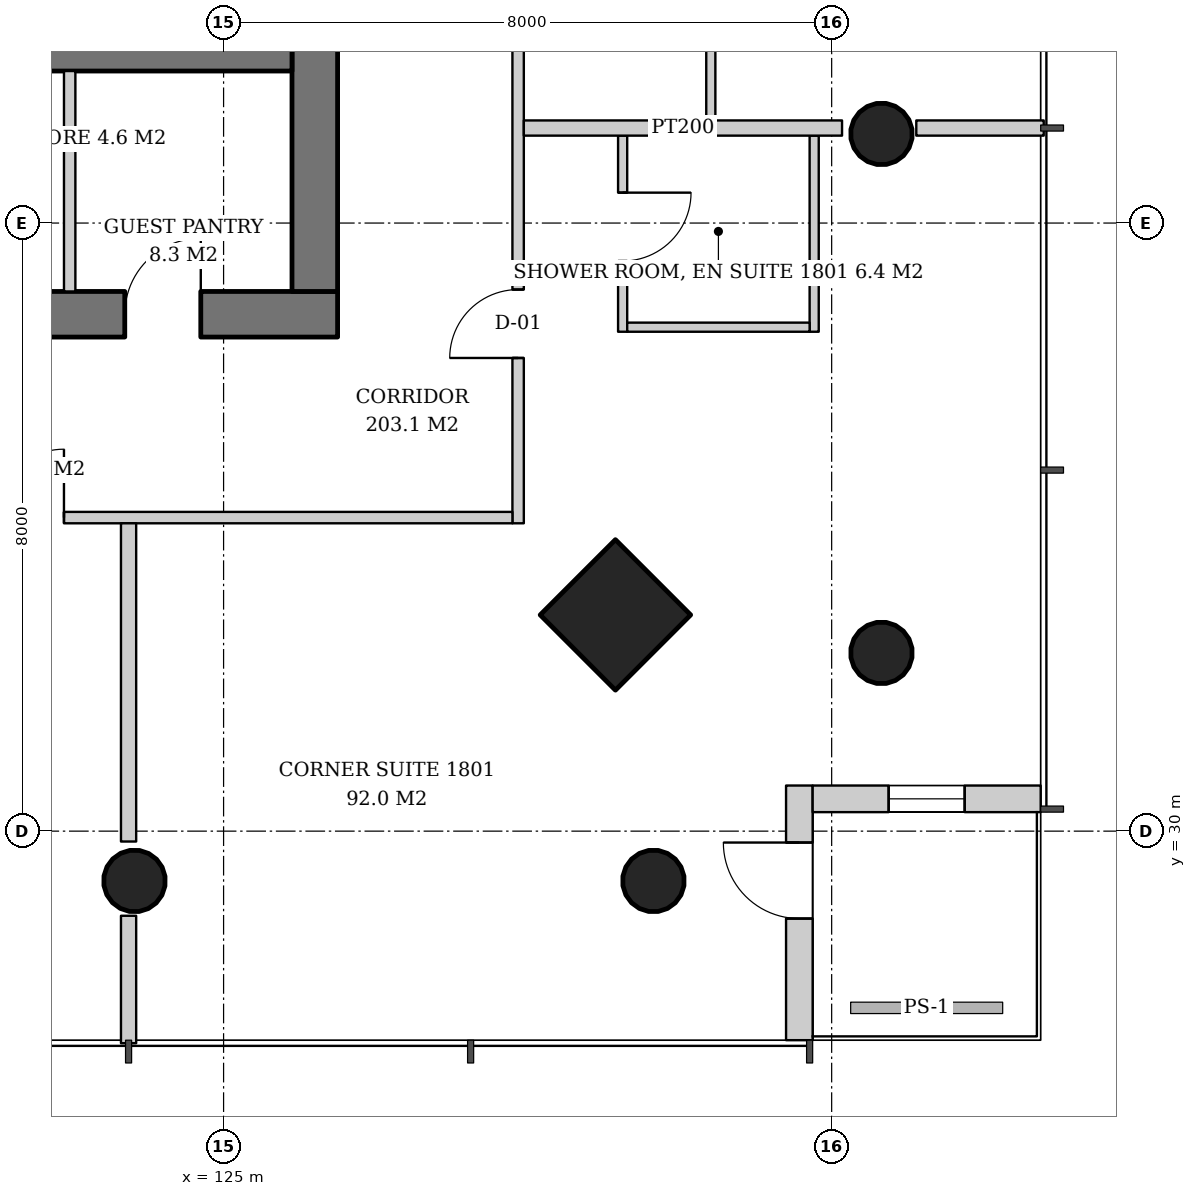
"""IFC4 building model, lengths in metres.
Left out: names, types, materials, properties, quantities, classifications, styles, units other than length and angle.
Written with IfcOpenShell. Run it as: python <this file> out.ifc"""

import sys

from ifc_helpers import new_model, si_unit, direction, frame, frame_2d, origin, origin_2d, place, context, subcontext, project, spatial, rectangle, hollow_circle, extrude, element, fill, save


model = new_model("IFC4")
c1 = context("Model", 3, precision=1e-05, world=origin(), true_north=direction((0.0, 1.0)))
c2 = subcontext(c1, "Body", "Model", "MODEL_VIEW")
j1 = project(units=[si_unit("LENGTHUNIT", "METRE"), si_unit("PLANEANGLEUNIT", "RADIAN")], contexts=[c1])
p1 = place(None, origin())
s1 = spatial("IfcSite", under=j1, at=p1, CompositionType="ELEMENT")
p2 = place(p1, origin())
s2 = spatial("IfcBuilding", under=s1, at=p2, CompositionType="ELEMENT")
p3 = place(p2, frame((0.0, 0.0, 74.2)))
s3 = spatial("IfcBuildingStorey", under=s2, at=p3, CompositionType="ELEMENT", Elevation=74.2)
p4 = place(p3, frame((133.707, 32.293, 0.0), z_axis=(-0.042965756413, 0.042965756413, 0.998152236661), x_axis=(-0.707106781187, -0.707106781187, 0.0)))
e1 = element("IfcColumn", 1, at=p4, inside=s3, PredefinedType="COLUMN", context=c2, shape_type="SweptSolid", body=[
    extrude(hollow_circle(Radius=0.406, WallThickness=0.03, at=origin_2d()), origin(), (0.0, 0.0, 1.0), 3.807),
])
p5 = place(p3, frame((133.707, 39.146, 0.0), z_axis=(-0.042995471882, 0.021561908287, 0.998842566929), x_axis=(-0.448280611873, -0.89389288677, 0.0)))
e2 = element("IfcColumn", 2, at=p5, inside=s3, PredefinedType="COLUMN", context=c2, shape_type="SweptSolid", body=[
    extrude(hollow_circle(Radius=0.406, WallThickness=0.03, at=origin_2d()), origin(), (0.0, 0.0, 1.0), 3.804),
])
p6 = place(p3, frame((130.207, 32.793, 0.0), z_axis=(-0.042965756413, 0.042965756413, 0.998152236661), x_axis=(-0.707106781187, -0.707106781187, 0.0)))
e3 = element("IfcColumn", 3, at=p6, inside=s3, PredefinedType="COLUMN", context=c2, shape_type="SweptSolid", body=[
    extrude(rectangle(XDim=1.4, YDim=1.4, at=origin_2d()), origin(), (0.0, 0.0, 1.0), 3.807),
])
p7 = place(p3, frame((130.707, 29.293, 0.0), z_axis=(-0.042965756413, 0.042965756413, 0.998152236661), x_axis=(-0.707106781187, -0.707106781187, 0.0)))
e4 = element("IfcColumn", 4, at=p7, inside=s3, PredefinedType="COLUMN", context=c2, shape_type="SweptSolid", body=[
    extrude(hollow_circle(Radius=0.406, WallThickness=0.03, at=origin_2d()), origin(), (0.0, 0.0, 1.0), 3.807),
])
p8 = place(p3, frame((123.854, 29.293, 0.0), z_axis=(-0.021561908287, 0.042995471882, 0.998842566929), x_axis=(-0.89389288677, -0.448280611873, 0.0)))
e5 = element("IfcColumn", 5, at=p8, inside=s3, PredefinedType="COLUMN", context=c2, shape_type="SweptSolid", body=[
    extrude(hollow_circle(Radius=0.406, WallThickness=0.03, at=origin_2d()), origin(), (0.0, 0.0, 1.0), 3.804),
])
p9 = place(p3, frame((107.5, 36.8, 0.0), z_axis=(0.0, 0.0, 1.0), x_axis=(1.0, 0.0, 0.0)))
e6 = element("IfcWall", 6, at=p9, inside=s3, PredefinedType="SHEAR", context=c2, shape_type="SweptSolid", body=[
    extrude(rectangle(XDim=19.0, YDim=0.6, at=frame_2d((9.5, 0.0))), origin(), (0.0, 0.0, 1.0), 3.8),
])
p10 = place(p9, frame((3.9, 0.0, 0.0)))
e7 = element("IfcOpeningElement", 7, at=p10, cuts=e6, PredefinedType="OPENING", context=c2, shape_type="SweptSolid", body=[
    extrude(rectangle(XDim=1.0, YDim=2.1, at=frame_2d((0.5, 1.05))), frame((0.0, 0.31, 0.0), z_axis=(0.0, -1.0, 0.0), x_axis=(1.0, 0.0, 0.0)), (0.0, 0.0, 1.0), 0.62),
])
p11 = place(p9, frame((14.153, 0.0, 0.0)))
e8 = element("IfcOpeningElement", 8, at=p11, cuts=e6, PredefinedType="OPENING", context=c2, shape_type="SweptSolid", body=[
    extrude(rectangle(XDim=1.0, YDim=2.1, at=frame_2d((0.5, 1.05))), frame((0.0, 0.31, 0.0), z_axis=(0.0, -1.0, 0.0), x_axis=(1.0, 0.0, 0.0)), (0.0, 0.0, 1.0), 0.62),
])
p12 = place(p9, frame((16.2, 0.0, 0.0)))
e9 = element("IfcOpeningElement", 9, at=p12, cuts=e6, PredefinedType="OPENING", context=c2, shape_type="SweptSolid", body=[
    extrude(rectangle(XDim=1.0, YDim=2.1, at=frame_2d((0.5, 1.05))), frame((0.0, 0.31, 0.0), z_axis=(0.0, -1.0, 0.0), x_axis=(1.0, 0.0, 0.0)), (0.0, 0.0, 1.0), 0.62),
])
p13 = place(p3, frame((126.2, 37.1, 0.0), z_axis=(0.0, 0.0, 1.0), x_axis=(0.0, 1.0, 0.0)))
e10 = element("IfcWall", 10, at=p13, inside=s3, PredefinedType="SHEAR", context=c2, shape_type="SweptSolid", body=[
    extrude(rectangle(XDim=17.8, YDim=0.6, at=frame_2d((8.9, 0.0))), origin(), (0.0, 0.0, 1.0), 3.8),
])
p14 = place(p13, frame((8.0, 0.0, 0.0)))
e11 = element("IfcOpeningElement", 11, at=p14, cuts=e10, PredefinedType="OPENING", context=c2, shape_type="SweptSolid", body=[
    extrude(rectangle(XDim=1.8, YDim=2.4, at=frame_2d((0.9, 1.2))), frame((0.0, 0.31, 0.0), z_axis=(0.0, -1.0, 0.0), x_axis=(1.0, 0.0, 0.0)), (0.0, 0.0, 1.0), 0.62),
])
p15 = place(p3, frame((108.1, 40.2, 0.0), z_axis=(0.0, 0.0, 1.0), x_axis=(1.0, 0.0, 0.0)))
e12 = element("IfcWall", 12, at=p15, inside=s3, PredefinedType="SHEAR", context=c2, shape_type="SweptSolid", body=[
    extrude(rectangle(XDim=17.8, YDim=0.4, at=frame_2d((8.9, 0.0))), origin(), (0.0, 0.0, 1.0), 3.8),
])
p16 = place(p3, frame((132.575, 27.25, 0.0), z_axis=(0.0, 0.0, 1.0), x_axis=(0.0, 1.0, 0.0)))
e13 = element("IfcWall", 13, at=p16, inside=s3, PredefinedType="SOLIDWALL", context=c2, shape_type="SweptSolid", body=[
    extrude(rectangle(XDim=3.35, YDim=0.35, at=frame_2d((1.675, 0.0))), origin(), (0.0, 0.0, 1.0), 3.6),
])
p17 = place(p16, frame((1.6, 0.0, 0.0)))
e14 = element("IfcOpeningElement", 14, at=p17, cuts=e13, PredefinedType="OPENING", context=c2, shape_type="SweptSolid", body=[
    extrude(rectangle(XDim=1.0, YDim=2.4, at=frame_2d((0.5, 1.2))), frame((0.0, 0.185, 0.0), z_axis=(0.0, -1.0, 0.0), x_axis=(1.0, 0.0, 0.0)), (0.0, 0.0, 1.0), 0.37),
])
p18 = place(p3, frame((132.75, 30.425, 0.0), z_axis=(0.0, 0.0, 1.0), x_axis=(1.0, 0.0, 0.0)))
e15 = element("IfcWall", 15, at=p18, inside=s3, PredefinedType="SOLIDWALL", context=c2, shape_type="SweptSolid", body=[
    extrude(rectangle(XDim=3.0, YDim=0.35, at=frame_2d((1.5, 0.0))), origin(), (0.0, 0.0, 1.0), 3.6),
])
p19 = place(p18, frame((1.0, 0.0, 0.9)))
e16 = element("IfcOpeningElement", 16, at=p19, cuts=e15, PredefinedType="OPENING", context=c2, shape_type="SweptSolid", body=[
    extrude(rectangle(XDim=1.0, YDim=2.4, at=frame_2d((0.5, 1.2))), frame((0.0, 0.185, 0.0), z_axis=(0.0, -1.0, 0.0), x_axis=(1.0, 0.0, 0.0)), (0.0, 0.0, 1.0), 0.37),
])
p20 = place(p3, frame((122.975, 37.1, 0.0), z_axis=(0.0, 0.0, 1.0), x_axis=(0.0, 1.0, 0.0)))
e17 = element("IfcWall", 17, at=p20, inside=s3, PredefinedType="SOLIDWALL", context=c2, shape_type="SweptSolid", body=[
    extrude(rectangle(XDim=2.9, YDim=0.15, at=frame_2d((1.45, 0.0))), origin(), (0.0, 0.0, 1.0), 3.6),
])
p21 = place(p3, frame((130.25, 39.15, 0.0), z_axis=(0.0, 0.0, 1.0), x_axis=(0.0, -1.0, 0.0)))
e18 = element("IfcWall", 18, at=p21, inside=s3, PredefinedType="PARTITIONING", context=c2, shape_type="SweptSolid", body=[
    extrude(rectangle(XDim=2.58, YDim=0.12, at=frame_2d((1.29, 0.0))), origin(), (0.0, 0.0, 1.0), 2.8),
])
p22 = place(p21, frame((0.75, 0.0, 0.0)))
e19 = element("IfcOpeningElement", 19, at=p22, cuts=e18, PredefinedType="OPENING", context=c2, shape_type="SweptSolid", body=[
    extrude(rectangle(XDim=0.9, YDim=2.1, at=frame_2d((0.45, 1.05))), frame((0.0, 0.07, 0.0), z_axis=(0.0, -1.0, 0.0), x_axis=(1.0, 0.0, 0.0)), (0.0, 0.0, 1.0), 0.14),
])
p23 = place(p3, frame((132.77, 39.15, 0.0), z_axis=(0.0, 0.0, 1.0), x_axis=(0.0, -1.0, 0.0)))
e20 = element("IfcWall", 20, at=p23, inside=s3, PredefinedType="PARTITIONING", context=c2, shape_type="SweptSolid", body=[
    extrude(rectangle(XDim=2.58, YDim=0.12, at=frame_2d((1.29, 0.0))), origin(), (0.0, 0.0, 1.0), 2.8),
])
p24 = place(p3, frame((130.31, 36.63, 0.0), z_axis=(0.0, 0.0, 1.0), x_axis=(1.0, 0.0, 0.0)))
e21 = element("IfcWall", 21, at=p24, inside=s3, PredefinedType="PARTITIONING", context=c2, shape_type="SweptSolid", body=[
    extrude(rectangle(XDim=2.4, YDim=0.12, at=frame_2d((1.2, 0.0))), origin(), (0.0, 0.0, 1.0), 2.8),
])
p25 = place(p3, frame((131.41, 39.35, 0.0), z_axis=(0.0, 0.0, 1.0), x_axis=(0.0, 1.0, 0.0)))
e22 = element("IfcWall", 22, at=p25, inside=s3, PredefinedType="PARTITIONING", context=c2, shape_type="SweptSolid", body=[
    extrude(rectangle(XDim=2.42, YDim=0.12, at=frame_2d((1.21, 0.0))), origin(), (0.0, 0.0, 1.0), 2.847),
])
p26 = place(p3, frame((128.875, 34.05, 0.0), z_axis=(0.0, 0.0, 1.0), x_axis=(0.0, 1.0, 0.0)))
e23 = element("IfcWall", 23, at=p26, inside=s3, PredefinedType="PARTITIONING", context=c2, shape_type="SweptSolid", body=[
    extrude(rectangle(XDim=23.75, YDim=0.15, at=frame_2d((11.875, 0.0))), origin(), (0.0, 0.0, 1.0), 2.8),
])
p27 = place(p26, frame((2.175, 0.0, 0.0)))
e24 = element("IfcOpeningElement", 24, at=p27, cuts=e23, PredefinedType="OPENING", context=c2, shape_type="SweptSolid", body=[
    extrude(rectangle(XDim=0.9, YDim=2.1, at=frame_2d((0.45, 1.05))), frame((0.0, 0.085, 0.0), z_axis=(0.0, -1.0, 0.0), x_axis=(1.0, 0.0, 0.0)), (0.0, 0.0, 1.0), 0.17),
])
p28 = place(p26, frame((7.95, 0.0, 0.0)))
e25 = element("IfcOpeningElement", 25, at=p28, cuts=e23, PredefinedType="OPENING", context=c2, shape_type="SweptSolid", body=[
    extrude(rectangle(XDim=0.9, YDim=2.1, at=frame_2d((0.45, 1.05))), frame((0.0, 0.085, 0.0), z_axis=(0.0, -1.0, 0.0), x_axis=(1.0, 0.0, 0.0)), (0.0, 0.0, 1.0), 0.17),
])
p29 = place(p26, frame((14.8, 0.0, 0.0)))
e26 = element("IfcOpeningElement", 26, at=p29, cuts=e23, PredefinedType="OPENING", context=c2, shape_type="SweptSolid", body=[
    extrude(rectangle(XDim=0.9, YDim=2.1, at=frame_2d((0.45, 1.05))), frame((0.0, 0.085, 0.0), z_axis=(0.0, -1.0, 0.0), x_axis=(1.0, 0.0, 0.0)), (0.0, 0.0, 1.0), 0.17),
])
p30 = place(p3, frame((128.95, 39.25, 0.0), z_axis=(0.0, 0.0, 1.0), x_axis=(1.0, 0.0, 0.0)))
e27 = element("IfcWall", 27, at=p30, inside=s3, PredefinedType="PARTITIONING", context=c2, shape_type="SweptSolid", body=[
    extrude(rectangle(XDim=4.187, YDim=0.2, at=frame_2d((2.093, 0.0))), origin(), (0.0, 0.0, 1.0), 3.6),
])
p31 = place(p3, frame((134.113, 39.25, 0.0), z_axis=(0.0, 0.0, 1.0), x_axis=(1.0, 0.0, 0.0)))
e28 = element("IfcWall", 28, at=p31, inside=s3, PredefinedType="PARTITIONING", context=c2, shape_type="SweptSolid", body=[
    extrude(rectangle(XDim=1.677, YDim=0.2, at=frame_2d((0.838, 0.0))), origin(), (0.0, 0.0, 1.0), 3.6),
])
p32 = place(p3, frame((105.05, 34.125, 0.0), z_axis=(0.0, 0.0, 1.0), x_axis=(1.0, 0.0, 0.0)))
e29 = element("IfcWall", 29, at=p32, inside=s3, PredefinedType="PARTITIONING", context=c2, shape_type="SweptSolid", body=[
    extrude(rectangle(XDim=23.75, YDim=0.15, at=frame_2d((11.875, 0.0))), origin(), (0.0, 0.0, 1.0), 2.8),
])
p33 = place(p32, frame((2.175, 0.0, 0.0)))
e30 = element("IfcOpeningElement", 30, at=p33, cuts=e29, PredefinedType="OPENING", context=c2, shape_type="SweptSolid", body=[
    extrude(rectangle(XDim=0.9, YDim=2.1, at=frame_2d((0.45, 1.05))), frame((0.0, 0.085, 0.0), z_axis=(0.0, -1.0, 0.0), x_axis=(1.0, 0.0, 0.0)), (0.0, 0.0, 1.0), 0.17),
])
p34 = place(p32, frame((7.95, 0.0, 0.0)))
e31 = element("IfcOpeningElement", 31, at=p34, cuts=e29, PredefinedType="OPENING", context=c2, shape_type="SweptSolid", body=[
    extrude(rectangle(XDim=0.9, YDim=2.1, at=frame_2d((0.45, 1.05))), frame((0.0, 0.085, 0.0), z_axis=(0.0, -1.0, 0.0), x_axis=(1.0, 0.0, 0.0)), (0.0, 0.0, 1.0), 0.17),
])
p35 = place(p32, frame((10.55, 0.0, 0.0)))
e32 = element("IfcOpeningElement", 32, at=p35, cuts=e29, PredefinedType="OPENING", context=c2, shape_type="SweptSolid", body=[
    extrude(rectangle(XDim=0.9, YDim=2.1, at=frame_2d((0.45, 1.05))), frame((0.0, 0.085, 0.0), z_axis=(0.0, -1.0, 0.0), x_axis=(1.0, 0.0, 0.0)), (0.0, 0.0, 1.0), 0.17),
])
p36 = place(p32, frame((16.95, 0.0, 0.0)))
e33 = element("IfcOpeningElement", 33, at=p36, cuts=e29, PredefinedType="OPENING", context=c2, shape_type="SweptSolid", body=[
    extrude(rectangle(XDim=0.9, YDim=2.1, at=frame_2d((0.45, 1.05))), frame((0.0, 0.085, 0.0), z_axis=(0.0, -1.0, 0.0), x_axis=(1.0, 0.0, 0.0)), (0.0, 0.0, 1.0), 0.17),
])
p37 = place(p3, frame((123.75, 34.05, 0.0), z_axis=(0.0, 0.0, 1.0), x_axis=(0.0, -1.0, 0.0)))
e34 = element("IfcWall", 34, at=p37, inside=s3, PredefinedType="PARTITIONING", context=c2, shape_type="SweptSolid", body=[
    extrude(rectangle(XDim=4.187, YDim=0.2, at=frame_2d((2.093, 0.0))), origin(), (0.0, 0.0, 1.0), 3.6),
])
p38 = place(p3, frame((123.75, 28.887, 0.0), z_axis=(0.0, 0.0, 1.0), x_axis=(0.0, -1.0, 0.0)))
e35 = element("IfcWall", 35, at=p38, inside=s3, PredefinedType="PARTITIONING", context=c2, shape_type="SweptSolid", body=[
    extrude(rectangle(XDim=1.677, YDim=0.2, at=frame_2d((0.838, 0.0))), origin(), (0.0, 0.0, 1.0), 3.6),
])
p39 = place(p17, origin())
e36 = element("IfcDoor", 36, at=p39, inside=s3, OperationType="SINGLE_SWING_RIGHT", PredefinedType="DOOR", context=c2, shape_type="SweptSolid", body=[
    extrude(rectangle(XDim=1.0, YDim=2.4, at=frame_2d((0.5, 1.2))), frame((0.0, 0.025, 0.0), z_axis=(0.0, -1.0, 0.0), x_axis=(1.0, 0.0, 0.0)), (0.0, 0.0, 1.0), 0.05),
])
fill(e14, e36)
p40 = place(p19, origin())
e37 = element("IfcWindow", 37, at=p40, inside=s3, PartitioningType="SINGLE_PANEL", PredefinedType="WINDOW", context=c2, shape_type="SweptSolid", body=[
    extrude(rectangle(XDim=1.0, YDim=2.4, at=frame_2d((0.5, 1.2))), frame((0.0, 0.03, 0.0), z_axis=(0.0, -1.0, 0.0), x_axis=(1.0, 0.0, 0.0)), (0.0, 0.0, 1.0), 0.06),
])
fill(e16, e37)
p41 = place(p12, origin())
e38 = element("IfcDoor", 38, at=p41, inside=s3, OperationType="SINGLE_SWING_RIGHT", PredefinedType="DOOR", context=c2, shape_type="SweptSolid", body=[
    extrude(rectangle(XDim=1.0, YDim=2.1, at=frame_2d((0.5, 1.05))), frame((0.0, 0.29, 0.0), z_axis=(0.0, -1.0, 0.0), x_axis=(1.0, 0.0, 0.0)), (0.0, 0.0, 1.0), 0.05),
])
fill(e9, e38)
p42 = place(p22, origin())
e39 = element("IfcDoor", 39, at=p42, inside=s3, OperationType="SINGLE_SWING_LEFT", PredefinedType="DOOR", context=c2, shape_type="SweptSolid", body=[
    extrude(rectangle(XDim=0.9, YDim=2.1, at=frame_2d((0.45, 1.05))), frame((0.0, 0.025, 0.0), z_axis=(0.0, -1.0, 0.0), x_axis=(1.0, 0.0, 0.0)), (0.0, 0.0, 1.0), 0.05),
])
fill(e19, e39)
p43 = place(p27, origin())
e40 = element("IfcDoor", 40, at=p43, inside=s3, OperationType="SINGLE_SWING_LEFT", PredefinedType="DOOR", context=c2, shape_type="SweptSolid", body=[
    extrude(rectangle(XDim=0.9, YDim=2.1, at=frame_2d((0.45, 1.05))), frame((0.0, 0.025, 0.0), z_axis=(0.0, -1.0, 0.0), x_axis=(1.0, 0.0, 0.0)), (0.0, 0.0, 1.0), 0.05),
])
fill(e24, e40)
p44 = place(p36, origin())
e41 = element("IfcDoor", 41, at=p44, inside=s3, OperationType="SINGLE_SWING_RIGHT", PredefinedType="DOOR", context=c2, shape_type="SweptSolid", body=[
    extrude(rectangle(XDim=0.9, YDim=2.1, at=frame_2d((0.45, 1.05))), frame((0.0, 0.025, 0.0), z_axis=(0.0, -1.0, 0.0), x_axis=(1.0, 0.0, 0.0)), (0.0, 0.0, 1.0), 0.05),
])
fill(e33, e41)
save(model, sys.argv[1])
